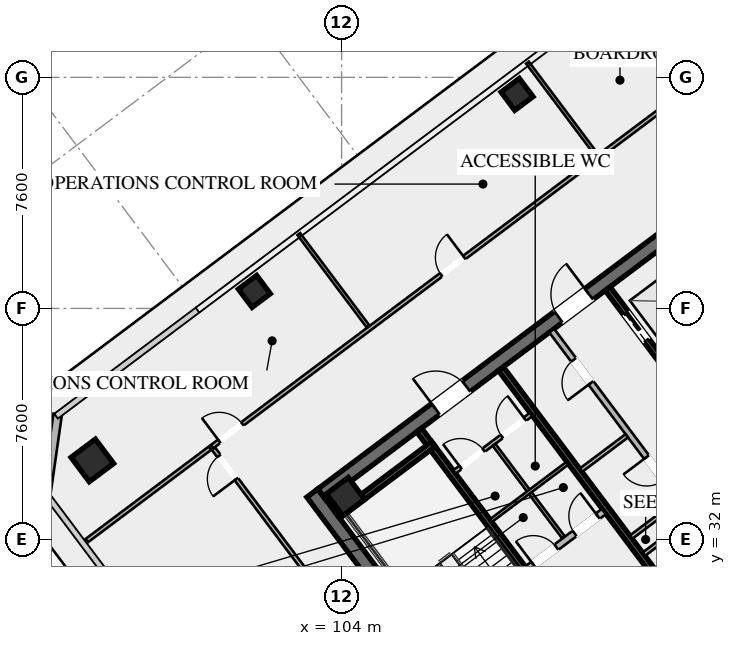
"""IFC4 building model, lengths in metres.
Left out: names, types, materials, properties, quantities, classifications, styles, units other than length and angle.
Written with IfcOpenShell. Run it as: python <this file> out.ifc"""

import sys

from ifc_helpers import new_model, si_unit, direction, frame, frame_2d, origin, origin_2d, place, context, subcontext, project, spatial, rectangle, hollow_rectangle, extrude, element, fill, save


model = new_model("IFC4")
c1 = context("Model", 3, precision=1e-05, world=origin(), true_north=direction((0.0, 1.0)))
c2 = subcontext(c1, "Body", "Model", "MODEL_VIEW")
j1 = project(units=[si_unit("LENGTHUNIT", "METRE"), si_unit("PLANEANGLEUNIT", "RADIAN")], contexts=[c1])
p1 = place(None, origin())
s1 = spatial("IfcSite", under=j1, at=p1, CompositionType="ELEMENT")
p2 = place(p1, origin())
s2 = spatial("IfcBuilding", under=s1, at=p2, CompositionType="ELEMENT")
p3 = place(p2, frame((0.0, 0.0, 232.6)))
s3 = spatial("IfcBuildingStorey", under=s2, at=p3, CompositionType="ELEMENT", Elevation=232.6)
p4 = place(p3, frame((112.396, 21.047, 0.0), z_axis=(0.0, 0.0, 1.0), x_axis=(-0.600005007985, 0.799996243986, 0.0)))
e1 = element("IfcWall", 1, at=p4, inside=s3, PredefinedType="SHEAR", context=c2, shape_type="SweptSolid", body=[
    extrude(rectangle(XDim=15.6, YDim=0.45, at=frame_2d((7.8, 0.0))), origin(), (0.0, 0.0, 1.0), 3.55),
])
p5 = place(p3, frame((103.351, 33.482, 0.0), z_axis=(0.0, 0.0, 1.0), x_axis=(0.8, 0.6, 0.0)))
e2 = element("IfcWall", 2, at=p5, inside=s3, PredefinedType="SHEAR", context=c2, shape_type="SweptSolid", body=[
    extrude(rectangle(XDim=15.26, YDim=0.45, at=frame_2d((7.63, 0.0))), origin(), (0.0, 0.0, 1.0), 3.55),
])
p6 = place(p5, frame((4.68, 0.0, 0.0)))
e3 = element("IfcOpeningElement", 3, at=p6, cuts=e2, PredefinedType="OPENING", context=c2, shape_type="SweptSolid", body=[
    extrude(rectangle(XDim=1.25, YDim=2.25, at=frame_2d((0.625, 1.125))), frame((0.0, 0.235, 0.0), z_axis=(0.0, -1.0, 0.0), x_axis=(1.0, 0.0, 0.0)), (0.0, 0.0, 1.0), 0.47),
])
p7 = place(p5, frame((9.73, 0.0, 0.0)))
e4 = element("IfcOpeningElement", 4, at=p7, cuts=e2, PredefinedType="OPENING", context=c2, shape_type="SweptSolid", body=[
    extrude(rectangle(XDim=1.25, YDim=2.25, at=frame_2d((0.625, 1.125))), frame((0.0, 0.235, 0.0), z_axis=(0.0, -1.0, 0.0), x_axis=(1.0, 0.0, 0.0)), (0.0, 0.0, 1.0), 0.47),
])
p8 = place(p3, frame((104.13, 33.41, 0.0), z_axis=(0.0, 0.0, 1.0), x_axis=(0.799999996291, 0.600000004945, 0.0)))
e5 = element("IfcColumn", 5, at=p8, inside=s3, PredefinedType="COLUMN", context=c2, shape_type="SweptSolid", body=[
    extrude(hollow_rectangle(XDim=0.9, YDim=0.9, WallThickness=0.04, at=origin_2d()), origin(), (0.0, 0.0, 1.0), 3.37),
])
p9 = place(p3, frame((95.8, 34.6, -0.175), z_axis=(0.0, 0.0, 1.0), x_axis=(0.799999996291, 0.600000004945, 0.0)))
e6 = element("IfcColumn", 6, at=p9, inside=s3, PredefinedType="COLUMN", context=c2, shape_type="SweptSolid", body=[
    extrude(hollow_rectangle(XDim=1.0, YDim=1.0, WallThickness=0.04, at=origin_2d()), origin(), (0.0, 0.0, 1.0), 3.545),
])
for number, where, z_axis, x_axis in (
    (7, (109.77, 46.64, -0.175), (0.0, 0.0, 1.0), (0.8, 0.6, 0.0)),
    (8, (101.13, 40.16, -0.175), (0.0, 0.0, 1.0), (0.8, 0.6, 0.0)),
):
    element("IfcColumn", number, at=place(p3, frame(where, z_axis=z_axis, x_axis=x_axis)), inside=s3, PredefinedType="COLUMN", context=c2, shape_type="SweptSolid", body=[
        extrude(hollow_rectangle(XDim=0.75, YDim=0.75, WallThickness=0.032, at=origin_2d()), origin(), (0.0, 0.0, 1.0), 3.545),
    ])
p10 = place(p3, frame((94.28, 33.46, 0.0), z_axis=(0.0, 0.0, 1.0), x_axis=(0.141370477216, 0.989956760759, 0.0)))
e9 = element("IfcWall", 9, at=p10, inside=s3, PredefinedType="SOLIDWALL", context=c2, shape_type="SweptSolid", body=[
    extrude(rectangle(XDim=2.687, YDim=0.28, at=frame_2d((1.344, 0.0))), origin(), (0.0, 0.0, 1.0), 3.37),
])
p11 = place(p3, frame((111.44, 29.08, 0.0), z_axis=(0.0, 0.0, 1.0), x_axis=(-0.59999041401, 0.800007189403, 0.0)))
e10 = element("IfcWall", 10, at=p11, inside=s3, PredefinedType="SHEAR", context=c2, shape_type="SweptSolid", body=[
    extrude(rectangle(XDim=8.15, YDim=0.2, at=frame_2d((4.075, 0.0))), origin(), (0.0, 0.0, 1.0), 3.37),
])
p12 = place(p11, frame((0.45, 0.0, 0.0)))
e11 = element("IfcOpeningElement", 11, at=p12, cuts=e10, PredefinedType="OPENING", context=c2, shape_type="SweptSolid", body=[
    extrude(rectangle(XDim=1.15, YDim=2.2, at=frame_2d((0.575, 1.1))), frame((0.0, 0.11, 0.0), z_axis=(0.0, -1.0, 0.0), x_axis=(1.0, 0.0, 0.0)), (0.0, 0.0, 1.0), 0.22),
])
p13 = place(p3, frame((103.876, 32.782, 0.0), z_axis=(0.0, 0.0, 1.0), x_axis=(0.800014909178, 0.599980120581, 0.0)))
e12 = element("IfcWall", 12, at=p13, inside=s3, PredefinedType="SHEAR", context=c2, shape_type="SweptSolid", body=[
    extrude(rectangle(XDim=3.93, YDim=0.2, at=frame_2d((1.965, 0.0))), origin(), (0.0, 0.0, 1.0), 3.37),
])
p14 = place(p3, frame((118.058, 25.856, 0.0), z_axis=(0.0, 0.0, 1.0), x_axis=(-0.600002657301, 0.799998007018, 0.0)))
e13 = element("IfcWall", 13, at=p14, inside=s3, PredefinedType="SHEAR", context=c2, shape_type="SweptSolid", body=[
    extrude(rectangle(XDim=14.7, YDim=0.2, at=frame_2d((7.35, 0.0))), origin(), (0.0, 0.0, 1.0), 3.37),
])
p15 = place(p3, frame((110.104, 31.028, 0.0), z_axis=(0.0, 0.0, 1.0), x_axis=(0.800018601094, 0.59997519774, 0.0)))
e14 = element("IfcWall", 14, at=p15, inside=s3, PredefinedType="SOLIDWALL", context=c2, shape_type="SweptSolid", body=[
    extrude(rectangle(XDim=3.15, YDim=0.22, at=frame_2d((1.575, 0.0))), origin(), (0.0, 0.0, 1.0), 2.723),
])
p16 = place(p15, frame((0.25, 0.0, 0.0)))
e15 = element("IfcOpeningElement", 15, at=p16, cuts=e14, PredefinedType="OPENING", context=c2, shape_type="SweptSolid", body=[
    extrude(rectangle(XDim=0.95, YDim=2.05, at=frame_2d((0.475, 1.025))), frame((0.0, 0.12, 0.0), z_axis=(0.0, -1.0, 0.0), x_axis=(1.0, 0.0, 0.0)), (0.0, 0.0, 1.0), 0.24),
])
p17 = place(p15, frame((1.95, 0.0, 0.0)))
e16 = element("IfcOpeningElement", 16, at=p17, cuts=e14, PredefinedType="OPENING", context=c2, shape_type="SweptSolid", body=[
    extrude(rectangle(XDim=0.95, YDim=2.05, at=frame_2d((0.475, 1.025))), frame((0.0, 0.12, 0.0), z_axis=(0.0, -1.0, 0.0), x_axis=(1.0, 0.0, 0.0)), (0.0, 0.0, 1.0), 0.24),
])
p18 = place(p3, frame((112.75, 40.25, 0.0), z_axis=(0.0, 0.0, 1.0), x_axis=(0.599994036198, -0.800004472816, 0.0)))
e17 = element("IfcWall", 17, at=p18, inside=s3, PredefinedType="SHEAR", context=c2, shape_type="SweptSolid", body=[
    extrude(rectangle(XDim=6.55, YDim=0.2, at=frame_2d((3.275, 0.0))), origin(), (0.0, 0.0, 1.0), 3.37),
])
p19 = place(p18, frame((5.075, 0.0, 0.0)))
e18 = element("IfcOpeningElement", 18, at=p19, cuts=e17, PredefinedType="OPENING", context=c2, shape_type="SweptSolid", body=[
    extrude(rectangle(XDim=1.1, YDim=2.2, at=frame_2d((0.55, 1.1))), frame((0.0, 0.11, 0.0), z_axis=(0.0, -1.0, 0.0), x_axis=(1.0, 0.0, 0.0)), (0.0, 0.0, 1.0), 0.22),
])
p20 = place(p18, frame((3.025, 0.0, 0.0)))
e19 = element("IfcOpeningElement", 19, at=p20, cuts=e17, PredefinedType="OPENING", context=c2, shape_type="SweptSolid", body=[
    extrude(rectangle(XDim=1.1, YDim=2.2, at=frame_2d((0.55, 1.1))), frame((0.0, 0.11, 0.0), z_axis=(0.0, -1.0, 0.0), x_axis=(1.0, 0.0, 0.0)), (0.0, 0.0, 1.0), 0.22),
])
p21 = place(p18, frame((1.025, 0.0, 0.0)))
e20 = element("IfcOpeningElement", 20, at=p21, cuts=e17, PredefinedType="OPENING", context=c2, shape_type="SweptSolid", body=[
    extrude(rectangle(XDim=1.1, YDim=2.2, at=frame_2d((0.55, 1.1))), frame((0.0, 0.11, 0.0), z_axis=(0.0, -1.0, 0.0), x_axis=(1.0, 0.0, 0.0)), (0.0, 0.0, 1.0), 0.22),
])
p22 = place(p3, frame((114.36, 38.27, 0.0), z_axis=(0.0, 0.0, 1.0), x_axis=(0.800008183455, 0.599989088572, 0.0)))
e21 = element("IfcWall", 21, at=p22, inside=s3, PredefinedType="SOLIDWALL", context=c2, shape_type="SweptSolid", body=[
    extrude(rectangle(XDim=3.58, YDim=0.2, at=frame_2d((1.79, 0.0))), origin(), (0.0, 0.0, 1.0), 3.37),
])
p23 = place(p3, frame((107.71, 34.22, 0.0), z_axis=(0.0, 0.0, 1.0), x_axis=(0.799981399002, 0.60002480053, 0.0)))
e22 = element("IfcWall", 22, at=p23, inside=s3, PredefinedType="PARTITIONING", context=c2, shape_type="SweptSolid", body=[
    extrude(rectangle(XDim=3.15, YDim=0.135, at=frame_2d((1.575, 0.0))), origin(), (0.0, 0.0, 1.0), 2.723),
])
p24 = place(p23, frame((0.25, 0.0, 0.0)))
e23 = element("IfcOpeningElement", 23, at=p24, cuts=e22, PredefinedType="OPENING", context=c2, shape_type="SweptSolid", body=[
    extrude(rectangle(XDim=0.95, YDim=2.05, at=frame_2d((0.475, 1.025))), frame((0.0, 0.077, 0.0), z_axis=(0.0, -1.0, 0.0), x_axis=(1.0, 0.0, 0.0)), (0.0, 0.0, 1.0), 0.155),
])
p25 = place(p23, frame((1.95, 0.0, 0.0)))
e24 = element("IfcOpeningElement", 24, at=p25, cuts=e22, PredefinedType="OPENING", context=c2, shape_type="SweptSolid", body=[
    extrude(rectangle(XDim=0.95, YDim=2.05, at=frame_2d((0.475, 1.025))), frame((0.0, 0.077, 0.0), z_axis=(0.0, -1.0, 0.0), x_axis=(1.0, 0.0, 0.0)), (0.0, 0.0, 1.0), 0.155),
])
p26 = place(p3, frame((111.296, 32.072, 0.0), z_axis=(0.0, 0.0, 1.0), x_axis=(-0.59995887973, 0.800030838552, 0.0)))
e25 = element("IfcWall", 25, at=p26, inside=s3, PredefinedType="PARTITIONING", context=c2, shape_type="SweptSolid", body=[
    extrude(rectangle(XDim=3.8, YDim=0.11, at=frame_2d((1.9, 0.0))), origin(), (0.0, 0.0, 1.0), 2.723),
])
p27 = place(p3, frame((108.91, 32.62, 0.0), z_axis=(0.0, 0.0, 1.0), x_axis=(0.800018601094, 0.59997519774, 0.0)))
e26 = element("IfcWall", 26, at=p27, inside=s3, PredefinedType="PARTITIONING", context=c2, shape_type="SweptSolid", body=[
    extrude(rectangle(XDim=3.15, YDim=0.11, at=frame_2d((1.575, 0.0))), origin(), (0.0, 0.0, 1.0), 2.723),
])
p28 = place(p3, frame((113.946, 31.522, 0.0), z_axis=(0.0, 0.0, 1.0), x_axis=(0.8, 0.6, 0.0)))
e27 = element("IfcWall", 27, at=p28, inside=s3, PredefinedType="PARTITIONING", context=c2, shape_type="SweptSolid", body=[
    extrude(rectangle(XDim=1.88, YDim=0.135, at=frame_2d((0.94, 0.0))), origin(), (0.0, 0.0, 1.0), 2.723),
])
p29 = place(p3, frame((115.11, 33.27, 0.0), z_axis=(0.0, 0.0, 1.0), x_axis=(-0.600011160345, 0.79999162962, 0.0)))
e28 = element("IfcWall", 28, at=p29, inside=s3, PredefinedType="SOLIDWALL", context=c2, shape_type="SweptSolid", body=[
    extrude(rectangle(XDim=7.0, YDim=0.2, at=frame_2d((3.5, 0.0))), origin(), (0.0, 0.0, 1.0), 2.723),
])
p30 = place(p29, frame((0.85, 0.0, 0.0)))
e29 = element("IfcOpeningElement", 29, at=p30, cuts=e28, PredefinedType="OPENING", context=c2, shape_type="SweptSolid", body=[
    extrude(rectangle(XDim=0.95, YDim=2.05, at=frame_2d((0.475, 1.025))), frame((0.0, 0.11, 0.0), z_axis=(0.0, -1.0, 0.0), x_axis=(1.0, 0.0, 0.0)), (0.0, 0.0, 1.0), 0.22),
])
p31 = place(p29, frame((4.85, 0.0, 0.0)))
e30 = element("IfcOpeningElement", 30, at=p31, cuts=e28, PredefinedType="OPENING", context=c2, shape_type="SweptSolid", body=[
    extrude(rectangle(XDim=0.95, YDim=2.05, at=frame_2d((0.475, 1.025))), frame((0.0, 0.11, 0.0), z_axis=(0.0, -1.0, 0.0), x_axis=(1.0, 0.0, 0.0)), (0.0, 0.0, 1.0), 0.22),
])
p32 = place(p3, frame((113.526, 32.082, 0.0), z_axis=(0.0, 0.0, 1.0), x_axis=(0.800046745961, 0.599937666993, 0.0)))
e31 = element("IfcWall", 31, at=p32, inside=s3, PredefinedType="PARTITIONING", context=c2, shape_type="SweptSolid", body=[
    extrude(rectangle(XDim=1.88, YDim=0.135, at=frame_2d((0.94, 0.0))), origin(), (0.0, 0.0, 1.0), 2.723),
])
p33 = place(p3, frame((111.876, 34.282, 0.0), z_axis=(0.0, 0.0, 1.0), x_axis=(0.8, 0.6, 0.0)))
e32 = element("IfcWall", 32, at=p33, inside=s3, PredefinedType="PARTITIONING", context=c2, shape_type="SweptSolid", body=[
    extrude(rectangle(XDim=1.88, YDim=0.135, at=frame_2d((0.94, 0.0))), origin(), (0.0, 0.0, 1.0), 2.723),
])
p34 = place(p3, frame((99.736, 35.052, 0.0), z_axis=(0.0, 0.0, 1.0), x_axis=(0.799997387685, 0.600003483071, 0.0)))
e33 = element("IfcWall", 33, at=p34, inside=s3, PredefinedType="PARTITIONING", context=c2, shape_type="SweptSolid", body=[
    extrude(rectangle(XDim=22.43, YDim=0.135, at=frame_2d((11.215, 0.0))), origin(), (0.0, 0.0, 1.0), 2.723),
])
p35 = place(p34, frame((0.3, 0.0, 0.0)))
e34 = element("IfcOpeningElement", 34, at=p35, cuts=e33, PredefinedType="OPENING", context=c2, shape_type="SweptSolid", body=[
    extrude(rectangle(XDim=0.95, YDim=2.05, at=frame_2d((0.475, 1.025))), frame((0.0, 0.077, 0.0), z_axis=(0.0, -1.0, 0.0), x_axis=(1.0, 0.0, 0.0)), (0.0, 0.0, 1.0), 0.155),
])
p36 = place(p34, frame((9.423, 0.0, 0.0)))
e35 = element("IfcOpeningElement", 35, at=p36, cuts=e33, PredefinedType="OPENING", context=c2, shape_type="SweptSolid", body=[
    extrude(rectangle(XDim=0.95, YDim=2.05, at=frame_2d((0.475, 1.025))), frame((0.0, 0.077, 0.0), z_axis=(0.0, -1.0, 0.0), x_axis=(1.0, 0.0, 0.0)), (0.0, 0.0, 1.0), 0.155),
])
p37 = place(p34, frame((21.18, 0.0, 0.0)))
e36 = element("IfcOpeningElement", 36, at=p37, cuts=e33, PredefinedType="OPENING", context=c2, shape_type="SweptSolid", body=[
    extrude(rectangle(XDim=0.95, YDim=2.05, at=frame_2d((0.475, 1.025))), frame((0.0, 0.077, 0.0), z_axis=(0.0, -1.0, 0.0), x_axis=(1.0, 0.0, 0.0)), (0.0, 0.0, 1.0), 0.155),
])
for number, where, z_axis, x_axis in (
    (37, (104.872, 39.004, 0.0), (0.0, 0.0, 1.0), (-0.6, 0.8, 0.0)),
    (38, (112.392, 44.644, 0.0), (0.0, 0.0, 1.0), (-0.6, 0.8, 0.0)),
):
    element("IfcWall", number, at=place(p3, frame(where, z_axis=z_axis, x_axis=x_axis)), inside=s3, PredefinedType="PARTITIONING", context=c2, shape_type="SweptSolid", body=[
        extrude(rectangle(XDim=3.8, YDim=0.11, at=frame_2d((1.9, 0.0))), origin(), (0.0, 0.0, 1.0), 2.723),
    ])
p38 = place(p3, frame((112.15, 18.5, 0.0), z_axis=(0.0, 0.0, 1.0), x_axis=(-0.599998104681, 0.800001421485, 0.0)))
e39 = element("IfcWall", 39, at=p38, inside=s3, PredefinedType="PARTITIONING", context=c2, shape_type="SweptSolid", body=[
    extrude(rectangle(XDim=20.61, YDim=0.135, at=frame_2d((10.305, 0.0))), origin(), (0.0, 0.0, 1.0), 2.723),
])
p39 = place(p38, frame((19.36, 0.0, 0.0)))
e40 = element("IfcOpeningElement", 40, at=p39, cuts=e39, PredefinedType="OPENING", context=c2, shape_type="SweptSolid", body=[
    extrude(rectangle(XDim=0.95, YDim=2.05, at=frame_2d((0.475, 1.025))), frame((0.0, 0.077, 0.0), z_axis=(0.0, -1.0, 0.0), x_axis=(1.0, 0.0, 0.0)), (0.0, 0.0, 1.0), 0.155),
])
p40 = place(p3, frame((99.672, 35.004, 0.0), z_axis=(0.0, 0.0, 1.0), x_axis=(-0.800011556537, -0.599984590975, 0.0)))
e41 = element("IfcWall", 41, at=p40, inside=s3, PredefinedType="PARTITIONING", context=c2, shape_type="SweptSolid", body=[
    extrude(rectangle(XDim=5.07, YDim=0.135, at=frame_2d((2.535, 0.0))), origin(), (0.0, 0.0, 1.0), 2.723),
])
p41 = place(p6, origin())
e42 = element("IfcDoor", 42, at=p41, inside=s3, OperationType="SINGLE_SWING_LEFT", PredefinedType="DOOR", context=c2, shape_type="SweptSolid", body=[
    extrude(rectangle(XDim=1.25, YDim=2.25, at=frame_2d((0.625, 1.125))), frame((0.0, 0.025, 0.0), z_axis=(0.0, -1.0, 0.0), x_axis=(1.0, 0.0, 0.0)), (0.0, 0.0, 1.0), 0.05),
])
fill(e3, e42)
p42 = place(p7, origin())
e43 = element("IfcDoor", 43, at=p42, inside=s3, OperationType="SINGLE_SWING_RIGHT", PredefinedType="DOOR", context=c2, shape_type="SweptSolid", body=[
    extrude(rectangle(XDim=1.25, YDim=2.25, at=frame_2d((0.625, 1.125))), frame((0.0, 0.025, 0.0), z_axis=(0.0, -1.0, 0.0), x_axis=(1.0, 0.0, 0.0)), (0.0, 0.0, 1.0), 0.05),
])
fill(e4, e43)
p43 = place(p24, origin())
e44 = element("IfcDoor", 44, at=p43, inside=s3, OperationType="SINGLE_SWING_LEFT", PredefinedType="DOOR", context=c2, shape_type="SweptSolid", body=[
    extrude(rectangle(XDim=0.95, YDim=2.05, at=frame_2d((0.475, 1.025))), frame((0.0, 0.025, 0.0), z_axis=(0.0, -1.0, 0.0), x_axis=(1.0, 0.0, 0.0)), (0.0, 0.0, 1.0), 0.05),
])
fill(e23, e44)
p44 = place(p25, origin())
e45 = element("IfcDoor", 45, at=p44, inside=s3, OperationType="SINGLE_SWING_RIGHT", PredefinedType="DOOR", context=c2, shape_type="SweptSolid", body=[
    extrude(rectangle(XDim=0.95, YDim=2.05, at=frame_2d((0.475, 1.025))), frame((0.0, 0.025, 0.0), z_axis=(0.0, -1.0, 0.0), x_axis=(1.0, 0.0, 0.0)), (0.0, 0.0, 1.0), 0.05),
])
fill(e24, e45)
p45 = place(p16, origin())
e46 = element("IfcDoor", 46, at=p45, inside=s3, OperationType="SINGLE_SWING_LEFT", PredefinedType="DOOR", context=c2, shape_type="SweptSolid", body=[
    extrude(rectangle(XDim=0.95, YDim=2.05, at=frame_2d((0.475, 1.025))), frame((0.0, 0.025, 0.0), z_axis=(0.0, -1.0, 0.0), x_axis=(1.0, 0.0, 0.0)), (0.0, 0.0, 1.0), 0.05),
])
fill(e15, e46)
p46 = place(p17, origin())
e47 = element("IfcDoor", 47, at=p46, inside=s3, OperationType="SINGLE_SWING_RIGHT", PredefinedType="DOOR", context=c2, shape_type="SweptSolid", body=[
    extrude(rectangle(XDim=0.95, YDim=2.05, at=frame_2d((0.475, 1.025))), frame((0.0, 0.025, 0.0), z_axis=(0.0, -1.0, 0.0), x_axis=(1.0, 0.0, 0.0)), (0.0, 0.0, 1.0), 0.05),
])
fill(e16, e47)
p47 = place(p30, origin())
e48 = element("IfcDoor", 48, at=p47, inside=s3, OperationType="SINGLE_SWING_RIGHT", PredefinedType="DOOR", context=c2, shape_type="SweptSolid", body=[
    extrude(rectangle(XDim=0.95, YDim=2.05, at=frame_2d((0.475, 1.025))), frame((0.0, 0.025, 0.0), z_axis=(0.0, -1.0, 0.0), x_axis=(1.0, 0.0, 0.0)), (0.0, 0.0, 1.0), 0.05),
])
fill(e29, e48)
p48 = place(p31, origin())
e49 = element("IfcDoor", 49, at=p48, inside=s3, OperationType="SINGLE_SWING_LEFT", PredefinedType="DOOR", context=c2, shape_type="SweptSolid", body=[
    extrude(rectangle(XDim=0.95, YDim=2.05, at=frame_2d((0.475, 1.025))), frame((0.0, 0.025, 0.0), z_axis=(0.0, -1.0, 0.0), x_axis=(1.0, 0.0, 0.0)), (0.0, 0.0, 1.0), 0.05),
])
fill(e30, e49)
p49 = place(p35, origin())
e50 = element("IfcDoor", 50, at=p49, inside=s3, OperationType="SINGLE_SWING_LEFT", PredefinedType="DOOR", context=c2, shape_type="SweptSolid", body=[
    extrude(rectangle(XDim=0.95, YDim=2.05, at=frame_2d((0.475, 1.025))), frame((0.0, 0.025, 0.0), z_axis=(0.0, -1.0, 0.0), x_axis=(1.0, 0.0, 0.0)), (0.0, 0.0, 1.0), 0.05),
])
fill(e34, e50)
p50 = place(p36, origin())
e51 = element("IfcDoor", 51, at=p50, inside=s3, OperationType="SINGLE_SWING_RIGHT", PredefinedType="DOOR", context=c2, shape_type="SweptSolid", body=[
    extrude(rectangle(XDim=0.95, YDim=2.05, at=frame_2d((0.475, 1.025))), frame((0.0, 0.025, 0.0), z_axis=(0.0, -1.0, 0.0), x_axis=(1.0, 0.0, 0.0)), (0.0, 0.0, 1.0), 0.05),
])
fill(e35, e51)
p51 = place(p39, origin())
e52 = element("IfcDoor", 52, at=p51, inside=s3, OperationType="SINGLE_SWING_LEFT", PredefinedType="DOOR", context=c2, shape_type="SweptSolid", body=[
    extrude(rectangle(XDim=0.95, YDim=2.05, at=frame_2d((0.475, 1.025))), frame((0.0, 0.025, 0.0), z_axis=(0.0, -1.0, 0.0), x_axis=(1.0, 0.0, 0.0)), (0.0, 0.0, 1.0), 0.05),
])
fill(e40, e52)
p52 = place(p21, origin())
e53 = element("IfcDoor", 53, at=p52, inside=s3, OperationType="SLIDING_TO_LEFT", PredefinedType="DOOR", context=c2, shape_type="SweptSolid", body=[
    extrude(rectangle(XDim=1.1, YDim=2.2, at=frame_2d((0.55, 1.1))), frame((0.0, 0.025, 0.0), z_axis=(0.0, -1.0, 0.0), x_axis=(1.0, 0.0, 0.0)), (0.0, 0.0, 1.0), 0.05),
])
fill(e20, e53)
save(model, sys.argv[1])
